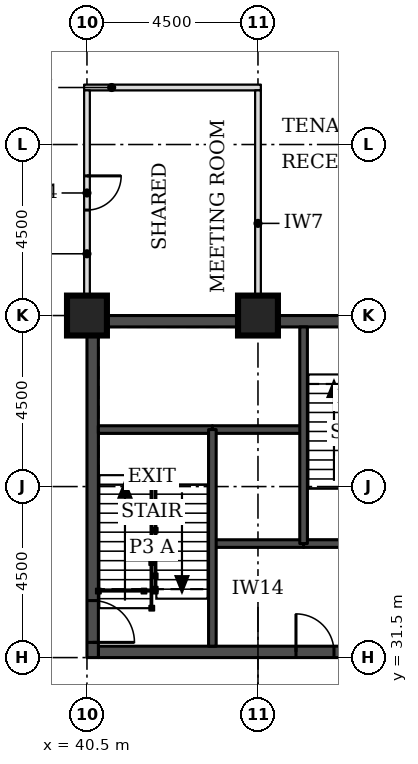
"""IFC4 building model, lengths in metres.
Left out: names, types, materials, properties, quantities, classifications, styles, units other than length and angle.
Written with IfcOpenShell. Run it as: python <this file> out.ifc"""

import sys

from ifc_helpers import new_model, si_unit, direction, frame, frame_2d, origin, origin_2d, place, context, subcontext, project, spatial, rectangle, extrude, element, fill, save


model = new_model("IFC4")
c1 = context("Model", 3, precision=1e-05, world=origin(), true_north=direction((0.0, 1.0)))
c2 = subcontext(c1, "Body", "Model", "MODEL_VIEW")
j1 = project(units=[si_unit("LENGTHUNIT", "METRE"), si_unit("PLANEANGLEUNIT", "RADIAN")], contexts=[c1])
p1 = place(None, origin())
s1 = spatial("IfcSite", under=j1, at=p1, CompositionType="ELEMENT")
p2 = place(p1, origin())
s2 = spatial("IfcBuilding", under=s1, at=p2, CompositionType="ELEMENT")
p3 = place(p2, frame((0.0, 0.0, 78.9)))
s3 = spatial("IfcBuildingStorey", under=s2, at=p3, CompositionType="ELEMENT", Elevation=78.9)
for number, where, z_axis, x_axis in (
    (1, (40.5, 40.5, 0.0), (0.0, 0.0, 1.0), (1.0, 0.0, 0.0)),
    (2, (45.0, 40.5, 0.0), (0.0, 0.0, 1.0), (1.0, 0.0, 0.0)),
):
    element("IfcColumn", number, at=place(p3, frame(where, z_axis=z_axis, x_axis=x_axis)), inside=s3, PredefinedType="COLUMN", context=c2, shape_type="SweptSolid", body=[
        extrude(rectangle(XDim=1.05, YDim=1.05, at=origin_2d()), origin(), (0.0, 0.0, 1.0), 3.7),
    ])
p4 = place(p3, frame((40.8, 31.65, 0.0), z_axis=(0.0, 0.0, 1.0), x_axis=(1.0, 0.0, 0.0)))
e3 = element("IfcWall", 3, at=p4, inside=s3, PredefinedType="SHEAR", context=c2, shape_type="SweptSolid", body=[
    extrude(rectangle(XDim=8.4, YDim=0.3, at=frame_2d((4.2, 0.0))), origin(), (0.0, 0.0, 1.0), 3.7),
])
p5 = place(p4, frame((5.2, 0.0, 0.0)))
e4 = element("IfcOpeningElement", 4, at=p5, cuts=e3, PredefinedType="OPENING", context=c2, shape_type="SweptSolid", body=[
    extrude(rectangle(XDim=1.0, YDim=2.1, at=frame_2d((0.5, 1.05))), frame((0.0, 0.16, 0.0), z_axis=(0.0, -1.0, 0.0), x_axis=(1.0, 0.0, 0.0)), (0.0, 0.0, 1.0), 0.32),
])
p6 = place(p3, frame((40.8, 40.35, 0.0), z_axis=(0.0, 0.0, 1.0), x_axis=(1.0, 0.0, 0.0)))
e5 = element("IfcWall", 5, at=p6, inside=s3, PredefinedType="SHEAR", context=c2, shape_type="SweptSolid", body=[
    extrude(rectangle(XDim=8.4, YDim=0.3, at=frame_2d((4.2, 0.0))), origin(), (0.0, 0.0, 1.0), 3.7),
])
p7 = place(p6, frame((6.4, 0.0, 0.0)))
e6 = element("IfcOpeningElement", 6, at=p7, cuts=e5, PredefinedType="OPENING", context=c2, shape_type="SweptSolid", body=[
    extrude(rectangle(XDim=1.1, YDim=2.1, at=frame_2d((0.55, 1.05))), frame((0.0, 0.16, 0.0), z_axis=(0.0, -1.0, 0.0), x_axis=(1.0, 0.0, 0.0)), (0.0, 0.0, 1.0), 0.32),
])
p8 = place(p3, frame((40.65, 31.5, 0.0), z_axis=(0.0, 0.0, 1.0), x_axis=(0.0, 1.0, 0.0)))
e7 = element("IfcWall", 7, at=p8, inside=s3, PredefinedType="SHEAR", context=c2, shape_type="SweptSolid", body=[
    extrude(rectangle(XDim=9.0, YDim=0.3, at=frame_2d((4.5, 0.0))), origin(), (0.0, 0.0, 1.0), 3.7),
])
p9 = place(p8, frame((0.4, 0.0, 0.0)))
e8 = element("IfcOpeningElement", 8, at=p9, cuts=e7, PredefinedType="OPENING", context=c2, shape_type="SweptSolid", body=[
    extrude(rectangle(XDim=1.1, YDim=2.1, at=frame_2d((0.55, 1.05))), frame((0.0, 0.16, 0.0), z_axis=(0.0, -1.0, 0.0), x_axis=(1.0, 0.0, 0.0)), (0.0, 0.0, 1.0), 0.32),
])
p10 = place(p3, frame((40.425, 46.5, 0.0), z_axis=(0.0, 0.0, 1.0), x_axis=(1.0, 0.0, 0.0)))
e9 = element("IfcWall", 9, at=p10, inside=s3, PredefinedType="PARTITIONING", context=c2, shape_type="SweptSolid", body=[
    extrude(rectangle(XDim=4.65, YDim=0.15, at=frame_2d((2.325, 0.0))), origin(), (0.0, 0.0, 1.0), 3.55),
])
p11 = place(p3, frame((40.5, 41.025, 0.0), z_axis=(0.0, 0.0, 1.0), x_axis=(0.0, 1.0, 0.0)))
e10 = element("IfcWall", 10, at=p11, inside=s3, PredefinedType="PARTITIONING", context=c2, shape_type="SweptSolid", body=[
    extrude(rectangle(XDim=5.4, YDim=0.15, at=frame_2d((2.7, 0.0))), origin(), (0.0, 0.0, 1.0), 3.55),
])
p12 = place(p11, frame((2.25, 0.0, 0.0)))
e11 = element("IfcOpeningElement", 11, at=p12, cuts=e10, PredefinedType="OPENING", context=c2, shape_type="SweptSolid", body=[
    extrude(rectangle(XDim=0.9, YDim=2.1, at=frame_2d((0.45, 1.05))), frame((0.0, 0.085, 0.0), z_axis=(0.0, -1.0, 0.0), x_axis=(1.0, 0.0, 0.0)), (0.0, 0.0, 1.0), 0.17),
])
p13 = place(p3, frame((45.0, 41.025, 0.0), z_axis=(0.0, 0.0, 1.0), x_axis=(0.0, 1.0, 0.0)))
e12 = element("IfcWall", 12, at=p13, inside=s3, PredefinedType="PARTITIONING", context=c2, shape_type="SweptSolid", body=[
    extrude(rectangle(XDim=5.4, YDim=0.15, at=frame_2d((2.7, 0.0))), origin(), (0.0, 0.0, 1.0), 3.55),
])
p14 = place(p3, frame((43.8, 34.5, 0.0), z_axis=(0.0, 0.0, 1.0), x_axis=(1.0, 0.0, 0.0)))
e13 = element("IfcWall", 13, at=p14, inside=s3, PredefinedType="SOLIDWALL", context=c2, shape_type="SweptSolid", body=[
    extrude(rectangle(XDim=2.4, YDim=0.2, at=frame_2d((1.2, 0.0))), origin(), (0.0, 0.0, 1.0), 3.55),
])
p15 = place(p3, frame((46.2, 34.5, 0.0), z_axis=(0.0, 0.0, 1.0), x_axis=(1.0, 0.0, 0.0)))
e14 = element("IfcWall", 14, at=p15, inside=s3, PredefinedType="SOLIDWALL", context=c2, shape_type="SweptSolid", body=[
    extrude(rectangle(XDim=3.0, YDim=0.2, at=frame_2d((1.5, 0.0))), origin(), (0.0, 0.0, 1.0), 3.55),
])
p16 = place(p3, frame((43.8, 37.5, 0.0), z_axis=(0.0, 0.0, 1.0), x_axis=(1.0, 0.0, 0.0)))
e15 = element("IfcWall", 15, at=p16, inside=s3, PredefinedType="SOLIDWALL", context=c2, shape_type="SweptSolid", body=[
    extrude(rectangle(XDim=2.4, YDim=0.2, at=frame_2d((1.2, 0.0))), origin(), (0.0, 0.0, 1.0), 3.7),
])
p17 = place(p3, frame((40.8, 37.5, 0.0), z_axis=(0.0, 0.0, 1.0), x_axis=(1.0, 0.0, 0.0)))
e16 = element("IfcWall", 16, at=p17, inside=s3, PredefinedType="SOLIDWALL", context=c2, shape_type="SweptSolid", body=[
    extrude(rectangle(XDim=3.0, YDim=0.2, at=frame_2d((1.5, 0.0))), origin(), (0.0, 0.0, 1.0), 3.55),
])
for number, where, z_axis, x_axis in (
    (17, (43.8, 31.8, 0.0), (0.0, 0.0, 1.0), (0.0, 1.0, 0.0)),
    (18, (46.2, 34.5, 0.0), (0.0, 0.0, 1.0), (0.0, 1.0, 0.0)),
):
    element("IfcWall", number, at=place(p3, frame(where, z_axis=z_axis, x_axis=x_axis)), inside=s3, PredefinedType="SOLIDWALL", context=c2, shape_type="SweptSolid", body=[
        extrude(rectangle(XDim=5.7, YDim=0.2, at=frame_2d((2.85, 0.0))), origin(), (0.0, 0.0, 1.0), 3.55),
    ])
p18 = place(p12, frame((0.9, 0.0, 0.0), z_axis=(0.0, 0.0, 1.0), x_axis=(-1.0, 0.0, 0.0)))
e19 = element("IfcDoor", 19, at=p18, inside=s3, OperationType="SINGLE_SWING_LEFT", PredefinedType="DOOR", context=c2, shape_type="SweptSolid", body=[
    extrude(rectangle(XDim=0.9, YDim=2.1, at=frame_2d((0.45, 1.05))), frame((0.0, 0.025, 0.0), z_axis=(0.0, -1.0, 0.0), x_axis=(1.0, 0.0, 0.0)), (0.0, 0.0, 1.0), 0.05),
])
fill(e11, e19)
p19 = place(p9, frame((1.1, 0.0, 0.0), z_axis=(0.0, 0.0, 1.0), x_axis=(-1.0, 0.0, 0.0)))
e20 = element("IfcDoor", 20, at=p19, inside=s3, OperationType="SINGLE_SWING_RIGHT", PredefinedType="DOOR", context=c2, shape_type="SweptSolid", body=[
    extrude(rectangle(XDim=1.1, YDim=2.1, at=frame_2d((0.55, 1.05))), frame((0.0, 0.025, 0.0), z_axis=(0.0, -1.0, 0.0), x_axis=(1.0, 0.0, 0.0)), (0.0, 0.0, 1.0), 0.05),
])
fill(e8, e20)
p20 = place(p5, origin())
e21 = element("IfcDoor", 21, at=p20, inside=s3, OperationType="SINGLE_SWING_LEFT", PredefinedType="DOOR", context=c2, shape_type="SweptSolid", body=[
    extrude(rectangle(XDim=1.0, YDim=2.1, at=frame_2d((0.5, 1.05))), frame((0.0, 0.025, 0.0), z_axis=(0.0, -1.0, 0.0), x_axis=(1.0, 0.0, 0.0)), (0.0, 0.0, 1.0), 0.05),
])
fill(e4, e21)
save(model, sys.argv[1])
